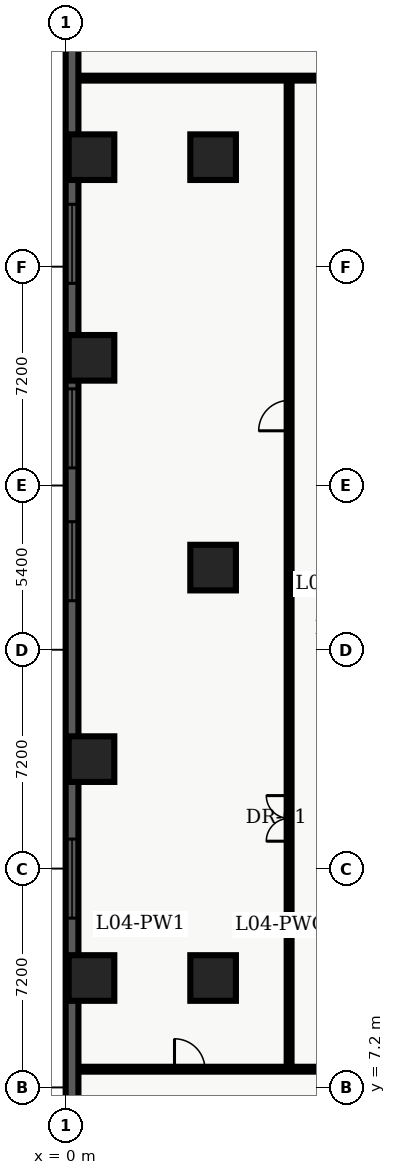
"""IFC4 building model, lengths in metres.
Left out: names, types, materials, properties, quantities, classifications, styles, units other than length and angle.
Written with IfcOpenShell. Run it as: python <this file> out.ifc"""

import sys

from ifc_helpers import new_model, entity, si_unit, converted_unit, direction, frame, origin_with_axes, origin_2d_with_axis, place, context, subcontext, project, spatial, polyline, rectangle, outline, extrude, element, fill, save


model = new_model("IFC4")
c1 = context("Model", 3, precision=1e-05, world=origin_with_axes(), true_north=direction((0.0, 1.0)))
c2 = subcontext(c1, "Body", "Model", "MODEL_VIEW")
j1 = project(units=[si_unit("LENGTHUNIT", "METRE"), converted_unit("PLANEANGLEUNIT", "DEGREE", entity("IfcPlaneAngleMeasure", 0.017), si_unit("PLANEANGLEUNIT", "RADIAN"), dimensions=[0, 0, 0, 0, 0, 0, 0])], contexts=[c1])
p1 = place(None, origin_with_axes())
s1 = spatial("IfcSite", under=j1, at=p1, CompositionType="ELEMENT")
p2 = place(p1, origin_with_axes())
s2 = spatial("IfcBuilding", under=s1, at=p2, CompositionType="ELEMENT")
p3 = place(p2, frame((0.0, 0.0, 19.8), z_axis=(0.0, 0.0, 1.0), x_axis=(1.0, 0.0, 0.0)))
s3 = spatial("IfcBuildingStorey", under=s2, at=p3, CompositionType="ELEMENT", Elevation=19.8)
for number, where, z_axis, x_axis in (
    (1, (4.85, 10.8, 0.0), (0.0, 0.0, 1.0), (1.0, 0.0, 0.0)),
    (2, (4.85, 24.3, 0.0), (0.0, 0.0, 1.0), (1.0, 0.0, 0.0)),
    (3, (4.85, 37.8, 0.0), (0.0, 0.0, 1.0), (1.0, 0.0, 0.0)),
    (4, (0.85, 10.8, 0.0), (0.0, 0.0, 1.0), (1.0, 0.0, 0.0)),
    (5, (0.85, 18.0, 0.0), (0.0, 0.0, 1.0), (1.0, 0.0, 0.0)),
    (6, (0.85, 31.2, 0.0), (0.0, 0.0, 1.0), (1.0, 0.0, 0.0)),
    (7, (0.85, 37.8, 0.0), (0.0, 0.0, 1.0), (1.0, 0.0, 0.0)),
):
    element("IfcColumn", number, at=place(p3, frame(where, z_axis=z_axis, x_axis=x_axis)), inside=s3, PredefinedType="COLUMN", context=c2, shape_type="SweptSolid", body=[
        extrude(rectangle(XDim=1.5, YDim=1.5, at=origin_2d_with_axis()), origin_with_axes(), (0.0, 0.0, 1.0), 4.5),
    ])
p4 = place(p3, frame((0.38, 7.8, 0.0), z_axis=(0.0, 0.0, 1.0), x_axis=(1.0, 0.0, 0.0)))
e8 = element("IfcWall", 8, at=p4, inside=s3, PredefinedType="PARTITIONING", context=c2, shape_type="SweptSolid", body=[
    extrude(outline(polyline([(0.0, -0.08), (20.92, -0.08), (20.92, 0.08), (0.0, 0.08), (0.0, -0.08)])), origin_with_axes(), (0.0, 0.0, 1.0), 3.2),
])
p5 = place(p4, frame((3.7, 0.0, 0.0), z_axis=(0.0, 0.0, 1.0), x_axis=(1.0, 0.0, 0.0)))
e9 = element("IfcOpeningElement", 9, at=p5, cuts=e8, PredefinedType="OPENING", context=c2, shape_type="SweptSolid", body=[
    extrude(rectangle(XDim=1.0, YDim=0.18, at=origin_2d_with_axis()), origin_with_axes(), (0.0, 0.0, 1.0), 2.15),
])
p6 = place(p4, frame((15.3, 0.0, 0.0), z_axis=(0.0, 0.0, 1.0), x_axis=(1.0, 0.0, 0.0)))
e10 = element("IfcOpeningElement", 10, at=p6, cuts=e8, PredefinedType="OPENING", context=c2, shape_type="SweptSolid", body=[
    extrude(rectangle(XDim=1.0, YDim=0.18, at=origin_2d_with_axis()), origin_with_axes(), (0.0, 0.0, 1.0), 2.15),
])
p7 = place(p3, frame((0.38, 40.4, 0.0), z_axis=(0.0, 0.0, 1.0), x_axis=(1.0, 0.0, 0.0)))
e11 = element("IfcWall", 11, at=p7, inside=s3, PredefinedType="PARTITIONING", context=c2, shape_type="SweptSolid", body=[
    extrude(outline(polyline([(0.0, -0.08), (20.92, -0.08), (20.92, 0.08), (0.0, 0.08), (0.0, -0.08)])), origin_with_axes(), (0.0, 0.0, 1.0), 3.2),
])
p8 = place(p7, frame((15.25, 0.0, 0.0), z_axis=(0.0, 0.0, 1.0), x_axis=(1.0, 0.0, 0.0)))
e12 = element("IfcOpeningElement", 12, at=p8, cuts=e11, PredefinedType="OPENING", context=c2, shape_type="SweptSolid", body=[
    extrude(rectangle(XDim=1.5, YDim=0.18, at=origin_2d_with_axis()), origin_with_axes(), (0.0, 0.0, 1.0), 2.2),
])
p9 = place(p3, frame((7.35, 7.8, 0.0), z_axis=(0.0, 0.0, 1.0), x_axis=(0.0, 1.0, 0.0)))
e13 = element("IfcWall", 13, at=p9, inside=s3, PredefinedType="PARTITIONING", context=c2, shape_type="SweptSolid", body=[
    extrude(outline(polyline([(0.0, -0.08), (32.6, -0.08), (32.6, 0.08), (0.0, 0.08), (0.0, -0.08)])), origin_with_axes(), (0.0, 0.0, 1.0), 3.2),
])
p10 = place(p9, frame((8.25, 0.0, 0.0), z_axis=(0.0, 0.0, 1.0), x_axis=(1.0, 0.0, 0.0)))
e14 = element("IfcOpeningElement", 14, at=p10, cuts=e13, PredefinedType="OPENING", context=c2, shape_type="SweptSolid", body=[
    extrude(rectangle(XDim=1.5, YDim=0.18, at=origin_2d_with_axis()), origin_with_axes(), (0.0, 0.0, 1.0), 2.2),
])
p11 = place(p9, frame((21.5, 0.0, 0.0), z_axis=(0.0, 0.0, 1.0), x_axis=(1.0, 0.0, 0.0)))
e15 = element("IfcOpeningElement", 15, at=p11, cuts=e13, PredefinedType="OPENING", context=c2, shape_type="SweptSolid", body=[
    extrude(rectangle(XDim=1.0, YDim=0.18, at=origin_2d_with_axis()), origin_with_axes(), (0.0, 0.0, 1.0), 2.15),
])
p12 = place(p3, frame((0.21, 0.42, 0.0), z_axis=(0.0, 0.0, 1.0), x_axis=(0.0, 1.0, 0.0)))
e16 = element("IfcWall", 16, at=p12, inside=s3, PredefinedType="SOLIDWALL", context=c2, shape_type="SweptSolid", body=[
    extrude(outline(polyline([(0.0, -0.21), (48.18, -0.21), (48.18, 0.21), (0.0, 0.21), (0.0, -0.21)])), origin_with_axes(), (0.0, 0.0, 1.0), 4.26),
])
p13 = place(p12, frame((13.65, 0.0, 0.45), z_axis=(0.0, 0.0, 1.0), x_axis=(1.0, 0.0, 0.0)))
e17 = element("IfcOpeningElement", 17, at=p13, cuts=e16, PredefinedType="OPENING", context=c2, shape_type="SweptSolid", body=[
    extrude(rectangle(XDim=2.6, YDim=0.44, at=origin_2d_with_axis()), origin_with_axes(), (0.0, 0.0, 1.0), 2.8),
])
p14 = place(p12, frame((24.09, 0.0, 0.45), z_axis=(0.0, 0.0, 1.0), x_axis=(1.0, 0.0, 0.0)))
e18 = element("IfcOpeningElement", 18, at=p14, cuts=e16, PredefinedType="OPENING", context=c2, shape_type="SweptSolid", body=[
    extrude(rectangle(XDim=2.6, YDim=0.44, at=origin_2d_with_axis()), origin_with_axes(), (0.0, 0.0, 1.0), 2.8),
])
p15 = place(p12, frame((28.46, 0.0, 0.45), z_axis=(0.0, 0.0, 1.0), x_axis=(1.0, 0.0, 0.0)))
e19 = element("IfcOpeningElement", 19, at=p15, cuts=e16, PredefinedType="OPENING", context=c2, shape_type="SweptSolid", body=[
    extrude(rectangle(XDim=2.6, YDim=0.44, at=origin_2d_with_axis()), origin_with_axes(), (0.0, 0.0, 1.0), 2.8),
])
p16 = place(p12, frame((34.53, 0.0, 0.45), z_axis=(0.0, 0.0, 1.0), x_axis=(1.0, 0.0, 0.0)))
e20 = element("IfcOpeningElement", 20, at=p16, cuts=e16, PredefinedType="OPENING", context=c2, shape_type="SweptSolid", body=[
    extrude(rectangle(XDim=2.6, YDim=0.44, at=origin_2d_with_axis()), origin_with_axes(), (0.0, 0.0, 1.0), 2.8),
])
p17 = place(p4, frame((3.7, 0.0, 0.0), z_axis=(0.0, 0.0, 1.0), x_axis=(1.0, 0.0, 0.0)))
e21 = element("IfcDoor", 21, at=p17, inside=s3, OperationType="SINGLE_SWING_LEFT", PredefinedType="DOOR", context=c2, shape_type="SweptSolid", body=[
    extrude(rectangle(XDim=1.0, YDim=0.09, at=origin_2d_with_axis()), origin_with_axes(), (0.0, 0.0, 1.0), 2.15),
])
fill(e9, e21)
p18 = place(p9, frame((8.25, 0.0, 0.0), z_axis=(0.0, 0.0, 1.0), x_axis=(1.0, 0.0, 0.0)))
e22 = element("IfcDoor", 22, at=p18, inside=s3, OperationType="DOUBLE_DOOR_SINGLE_SWING", PredefinedType="DOOR", context=c2, shape_type="SweptSolid", body=[
    extrude(rectangle(XDim=1.5, YDim=0.09, at=origin_2d_with_axis()), origin_with_axes(), (0.0, 0.0, 1.0), 2.2),
])
fill(e14, e22)
p19 = place(p9, frame((21.5, 0.0, 0.0), z_axis=(0.0, 0.0, 1.0), x_axis=(1.0, 0.0, 0.0)))
e23 = element("IfcDoor", 23, at=p19, inside=s3, OperationType="SINGLE_SWING_LEFT", PredefinedType="DOOR", context=c2, shape_type="SweptSolid", body=[
    extrude(rectangle(XDim=1.0, YDim=0.09, at=origin_2d_with_axis()), origin_with_axes(), (0.0, 0.0, 1.0), 2.15),
])
fill(e15, e23)
p20 = place(p12, frame((13.65, 0.0, 0.45), z_axis=(0.0, 0.0, 1.0), x_axis=(1.0, 0.0, 0.0)))
e24 = element("IfcWindow", 24, at=p20, inside=s3, PredefinedType="WINDOW", context=c2, shape_type="SweptSolid", body=[
    extrude(rectangle(XDim=2.6, YDim=0.09, at=origin_2d_with_axis()), origin_with_axes(), (0.0, 0.0, 1.0), 2.8),
])
fill(e17, e24)
p21 = place(p12, frame((24.09, 0.0, 0.45), z_axis=(0.0, 0.0, 1.0), x_axis=(1.0, 0.0, 0.0)))
e25 = element("IfcWindow", 25, at=p21, inside=s3, PredefinedType="WINDOW", context=c2, shape_type="SweptSolid", body=[
    extrude(rectangle(XDim=2.6, YDim=0.09, at=origin_2d_with_axis()), origin_with_axes(), (0.0, 0.0, 1.0), 2.8),
])
fill(e18, e25)
p22 = place(p12, frame((28.46, 0.0, 0.45), z_axis=(0.0, 0.0, 1.0), x_axis=(1.0, 0.0, 0.0)))
e26 = element("IfcWindow", 26, at=p22, inside=s3, PredefinedType="WINDOW", context=c2, shape_type="SweptSolid", body=[
    extrude(rectangle(XDim=2.6, YDim=0.09, at=origin_2d_with_axis()), origin_with_axes(), (0.0, 0.0, 1.0), 2.8),
])
fill(e19, e26)
p23 = place(p12, frame((34.53, 0.0, 0.45), z_axis=(0.0, 0.0, 1.0), x_axis=(1.0, 0.0, 0.0)))
e27 = element("IfcWindow", 27, at=p23, inside=s3, PredefinedType="WINDOW", context=c2, shape_type="SweptSolid", body=[
    extrude(rectangle(XDim=2.6, YDim=0.09, at=origin_2d_with_axis()), origin_with_axes(), (0.0, 0.0, 1.0), 2.8),
])
fill(e20, e27)
save(model, sys.argv[1])
